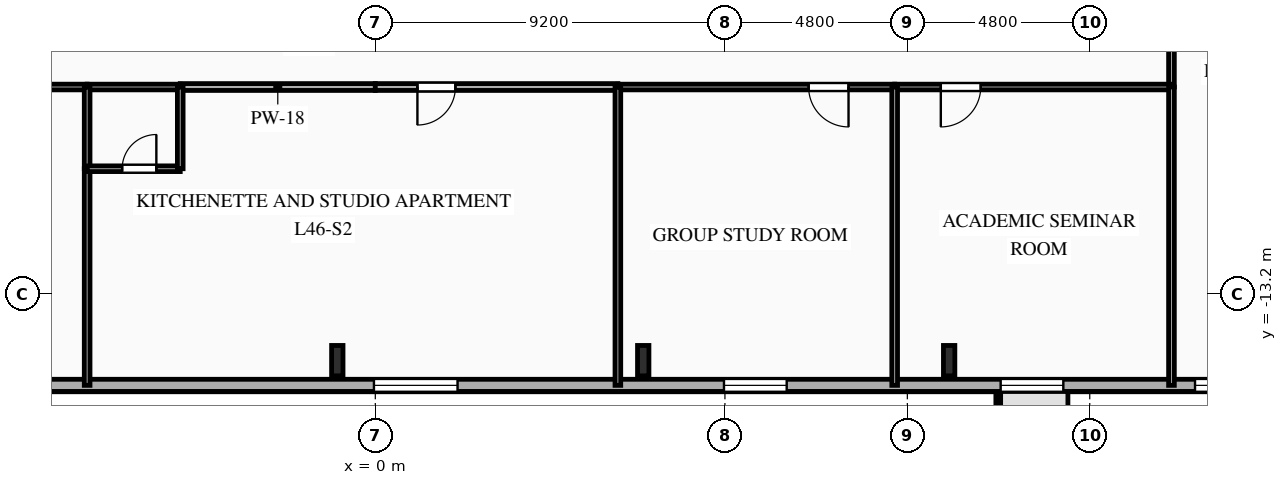
"""IFC4 building model, lengths in metres.
Left out: names, types, materials, properties, quantities, classifications, styles, units other than length and angle.
Written with IfcOpenShell. Run it as: python <this file> out.ifc"""

import sys

from ifc_helpers import new_model, si_unit, direction, frame, frame_2d, origin, origin_2d, place, context, subcontext, project, spatial, rectangle, i_section, extrude, element, fill, save


model = new_model("IFC4")
c1 = context("Model", 3, precision=1e-05, world=origin(), true_north=direction((0.0, 1.0)))
c2 = subcontext(c1, "Body", "Model", "MODEL_VIEW")
j1 = project(units=[si_unit("LENGTHUNIT", "METRE"), si_unit("PLANEANGLEUNIT", "RADIAN")], contexts=[c1])
p1 = place(None, origin())
s1 = spatial("IfcSite", under=j1, at=p1, CompositionType="ELEMENT")
p2 = place(p1, origin())
s2 = spatial("IfcBuilding", under=s1, at=p2, CompositionType="ELEMENT")
p3 = place(p2, frame((0.0, 0.0, 164.5)))
s3 = spatial("IfcBuildingStorey", under=s2, at=p3, CompositionType="ELEMENT", Elevation=164.5)
for number, where, z_axis, x_axis in (
    (1, (-1.0, -14.95, 0.0), (0.0, 0.0, 1.0), (1.0, 0.0, 0.0)),
    (2, (7.05, -14.95, 0.0), (0.0, 0.0, 1.0), (1.0, 0.0, 0.0)),
    (3, (15.1, -14.95, 0.0), (0.0, 0.0, 1.0), (1.0, 0.0, 0.0)),
):
    element("IfcColumn", number, at=place(p3, frame(where, z_axis=z_axis, x_axis=x_axis)), inside=s3, PredefinedType="COLUMN", context=c2, shape_type="SweptSolid", body=[
        extrude(i_section(OverallWidth=0.3, OverallDepth=0.8, WebThickness=0.018, FlangeThickness=0.033, FilletRadius=0.03, at=origin_2d()), origin(), (0.0, 0.0, 1.0), 3.35),
    ])
p4 = place(p3, frame((23.8, -15.6, 0.0), z_axis=(0.0, 0.0, 1.0), x_axis=(-1.0, 0.0, 0.0)))
e4 = element("IfcWall", 4, at=p4, inside=s3, PredefinedType="SOLIDWALL", context=c2, shape_type="SweptSolid", body=[
    extrude(rectangle(XDim=49.6, YDim=0.32, at=frame_2d((24.8, 0.0))), origin(), (0.0, 0.0, 1.0), 3.04),
])
p5 = place(p4, frame((1.13, 0.0, 0.85)))
e5 = element("IfcOpeningElement", 5, at=p5, cuts=e4, PredefinedType="OPENING", context=c2, shape_type="SweptSolid", body=[
    extrude(rectangle(XDim=1.1, YDim=1.85, at=frame_2d((0.55, 0.925))), frame((0.0, 0.17, 0.0), z_axis=(0.0, -1.0, 0.0), x_axis=(1.0, 0.0, 0.0)), (0.0, 0.0, 1.0), 0.34),
])
p6 = place(p4, frame((5.695, 0.0, 0.85)))
e6 = element("IfcOpeningElement", 6, at=p6, cuts=e4, PredefinedType="OPENING", context=c2, shape_type="SweptSolid", body=[
    extrude(rectangle(XDim=1.65, YDim=1.85, at=frame_2d((0.825, 0.925))), frame((0.0, 0.17, 0.0), z_axis=(0.0, -1.0, 0.0), x_axis=(1.0, 0.0, 0.0)), (0.0, 0.0, 1.0), 0.34),
])
p7 = place(p4, frame((12.975, 0.0, 0.85)))
e7 = element("IfcOpeningElement", 7, at=p7, cuts=e4, PredefinedType="OPENING", context=c2, shape_type="SweptSolid", body=[
    extrude(rectangle(XDim=1.65, YDim=1.85, at=frame_2d((0.825, 0.925))), frame((0.0, 0.17, 0.0), z_axis=(0.0, -1.0, 0.0), x_axis=(1.0, 0.0, 0.0)), (0.0, 0.0, 1.0), 0.34),
])
p8 = place(p4, frame((21.636, 0.0, 0.85)))
e8 = element("IfcOpeningElement", 8, at=p8, cuts=e4, PredefinedType="OPENING", context=c2, shape_type="SweptSolid", body=[
    extrude(rectangle(XDim=2.2, YDim=1.85, at=frame_2d((1.1, 0.925))), frame((0.0, 0.17, 0.0), z_axis=(0.0, -1.0, 0.0), x_axis=(1.0, 0.0, 0.0)), (0.0, 0.0, 1.0), 0.34),
])
p9 = place(p4, frame((33.935, 0.0, 0.85)))
e9 = element("IfcOpeningElement", 9, at=p9, cuts=e4, PredefinedType="OPENING", context=c2, shape_type="SweptSolid", body=[
    extrude(rectangle(XDim=1.65, YDim=1.85, at=frame_2d((0.825, 0.925))), frame((0.0, 0.17, 0.0), z_axis=(0.0, -1.0, 0.0), x_axis=(1.0, 0.0, 0.0)), (0.0, 0.0, 1.0), 0.34),
])
p10 = place(p4, frame((41.24, 0.0, 0.85)))
e10 = element("IfcOpeningElement", 10, at=p10, cuts=e4, PredefinedType="OPENING", context=c2, shape_type="SweptSolid", body=[
    extrude(rectangle(XDim=1.65, YDim=1.85, at=frame_2d((0.825, 0.925))), frame((0.0, 0.17, 0.0), z_axis=(0.0, -1.0, 0.0), x_axis=(1.0, 0.0, 0.0)), (0.0, 0.0, 1.0), 0.34),
])
p11 = place(p4, frame((46.175, 0.0, 0.85)))
e11 = element("IfcOpeningElement", 11, at=p11, cuts=e4, PredefinedType="OPENING", context=c2, shape_type="SweptSolid", body=[
    extrude(rectangle(XDim=1.65, YDim=1.85, at=frame_2d((0.825, 0.925))), frame((0.0, 0.17, 0.0), z_axis=(0.0, -1.0, 0.0), x_axis=(1.0, 0.0, 0.0)), (0.0, 0.0, 1.0), 0.34),
])
p12 = place(p3, frame((-7.583, -7.75, 0.0), z_axis=(0.0, 0.0, 1.0), x_axis=(-1.0, 0.0, 0.0)))
e12 = element("IfcWall", 12, at=p12, inside=s3, PredefinedType="PARTITIONING", context=c2, shape_type="SweptSolid", body=[
    extrude(rectangle(XDim=6.684, YDim=0.15, at=frame_2d((3.342, 0.0))), origin(), (0.0, 0.0, 1.0), 3.04),
])
p13 = place(p12, frame((4.494, 0.0, 0.0)))
e13 = element("IfcOpeningElement", 13, at=p13, cuts=e12, PredefinedType="OPENING", context=c2, shape_type="SweptSolid", body=[
    extrude(rectangle(XDim=1.05, YDim=2.15, at=frame_2d((0.525, 1.075))), frame((0.0, 0.085, 0.0), z_axis=(0.0, -1.0, 0.0), x_axis=(1.0, 0.0, 0.0)), (0.0, 0.0, 1.0), 0.17),
])
p14 = place(p3, frame((0.0, -7.75, 0.0), z_axis=(0.0, 0.0, 1.0), x_axis=(-1.0, 0.0, 0.0)))
e14 = element("IfcWall", 14, at=p14, inside=s3, PredefinedType="PARTITIONING", context=c2, shape_type="SweptSolid", body=[
    extrude(rectangle(XDim=5.133, YDim=0.18, at=frame_2d((2.566, 0.0))), origin(), (0.0, 0.0, 1.0), 3.04),
])
p15 = place(p3, frame((-5.133, -7.75, 0.0), z_axis=(0.0, 0.0, 1.0), x_axis=(-1.0, 0.0, 0.0)))
e15 = element("IfcWall", 15, at=p15, inside=s3, PredefinedType="PLUMBINGWALL", context=c2, shape_type="SweptSolid", body=[
    extrude(rectangle(XDim=2.45, YDim=0.15, at=frame_2d((1.225, 0.0))), origin(), (0.0, 0.0, 1.0), 3.04),
])
p16 = place(p3, frame((20.95, -5.6, 0.0), z_axis=(0.0, 0.0, 1.0), x_axis=(0.0, -1.0, 0.0)))
e16 = element("IfcWall", 16, at=p16, inside=s3, PredefinedType="PARTITIONING", context=c2, shape_type="SweptSolid", body=[
    extrude(rectangle(XDim=2.15, YDim=0.15, at=frame_2d((1.075, 0.0))), origin(), (0.0, 0.0, 1.0), 3.04),
])
p17 = place(p3, frame((6.383, -7.75, 0.0), z_axis=(0.0, 0.0, 1.0), x_axis=(-1.0, 0.0, 0.0)))
e17 = element("IfcWall", 17, at=p17, inside=s3, PredefinedType="PARTITIONING", context=c2, shape_type="SweptSolid", body=[
    extrude(rectangle(XDim=6.383, YDim=0.18, at=frame_2d((3.191, 0.0))), origin(), (0.0, 0.0, 1.0), 3.04),
])
p18 = place(p17, frame((4.275, 0.0, 0.0)))
e18 = element("IfcOpeningElement", 18, at=p18, cuts=e17, PredefinedType="OPENING", context=c2, shape_type="SweptSolid", body=[
    extrude(rectangle(XDim=1.0, YDim=2.15, at=frame_2d((0.5, 1.075))), frame((0.0, 0.1, 0.0), z_axis=(0.0, -1.0, 0.0), x_axis=(1.0, 0.0, 0.0)), (0.0, 0.0, 1.0), 0.2),
])
p19 = place(p3, frame((13.667, -7.75, 0.0), z_axis=(0.0, 0.0, 1.0), x_axis=(-1.0, 0.0, 0.0)))
e19 = element("IfcWall", 19, at=p19, inside=s3, PredefinedType="PARTITIONING", context=c2, shape_type="SweptSolid", body=[
    extrude(rectangle(XDim=7.283, YDim=0.15, at=frame_2d((3.642, 0.0))), origin(), (0.0, 0.0, 1.0), 3.04),
])
p20 = place(p19, frame((1.214, 0.0, 0.0)))
e20 = element("IfcOpeningElement", 20, at=p20, cuts=e19, PredefinedType="OPENING", context=c2, shape_type="SweptSolid", body=[
    extrude(rectangle(XDim=1.05, YDim=2.15, at=frame_2d((0.525, 1.075))), frame((0.0, 0.085, 0.0), z_axis=(0.0, -1.0, 0.0), x_axis=(1.0, 0.0, 0.0)), (0.0, 0.0, 1.0), 0.17),
])
p21 = place(p3, frame((20.95, -7.75, 0.0), z_axis=(0.0, 0.0, 1.0), x_axis=(-1.0, 0.0, 0.0)))
e21 = element("IfcWall", 21, at=p21, inside=s3, PredefinedType="PARTITIONING", context=c2, shape_type="SweptSolid", body=[
    extrude(rectangle(XDim=7.283, YDim=0.15, at=frame_2d((3.642, 0.0))), origin(), (0.0, 0.0, 1.0), 3.04),
])
p22 = place(p21, frame((5.019, 0.0, 0.0)))
e22 = element("IfcOpeningElement", 22, at=p22, cuts=e21, PredefinedType="OPENING", context=c2, shape_type="SweptSolid", body=[
    extrude(rectangle(XDim=1.05, YDim=2.15, at=frame_2d((0.525, 1.075))), frame((0.0, 0.085, 0.0), z_axis=(0.0, -1.0, 0.0), x_axis=(1.0, 0.0, 0.0)), (0.0, 0.0, 1.0), 0.17),
])
p23 = place(p3, frame((20.95, -15.6, 0.0), z_axis=(0.0, 0.0, 1.0), x_axis=(0.0, 1.0, 0.0)))
e23 = element("IfcWall", 23, at=p23, inside=s3, PredefinedType="PARTITIONING", context=c2, shape_type="SweptSolid", body=[
    extrude(rectangle(XDim=7.85, YDim=0.15, at=frame_2d((3.925, 0.0))), origin(), (0.0, 0.0, 1.0), 3.04),
])
p24 = place(p3, frame((-7.583, -9.9, 0.0), z_axis=(0.0, 0.0, 1.0), x_axis=(0.0, -1.0, 0.0)))
e24 = element("IfcWall", 24, at=p24, inside=s3, PredefinedType="PARTITIONING", context=c2, shape_type="SweptSolid", body=[
    extrude(rectangle(XDim=5.7, YDim=0.15, at=frame_2d((2.85, 0.0))), origin(), (0.0, 0.0, 1.0), 3.04),
])
p25 = place(p3, frame((-7.583, -7.75, 0.0), z_axis=(0.0, 0.0, 1.0), x_axis=(0.0, -1.0, 0.0)))
e25 = element("IfcWall", 25, at=p25, inside=s3, PredefinedType="PLUMBINGWALL", context=c2, shape_type="SweptSolid", body=[
    extrude(rectangle(XDim=2.15, YDim=0.15, at=frame_2d((1.075, 0.0))), origin(), (0.0, 0.0, 1.0), 3.04),
])
p26 = place(p3, frame((-7.583, -9.9, 0.0), z_axis=(0.0, 0.0, 1.0), x_axis=(1.0, 0.0, 0.0)))
e26 = element("IfcWall", 26, at=p26, inside=s3, PredefinedType="PLUMBINGWALL", context=c2, shape_type="SweptSolid", body=[
    extrude(rectangle(XDim=2.45, YDim=0.15, at=frame_2d((1.225, 0.0))), origin(), (0.0, 0.0, 1.0), 3.04),
])
p27 = place(p26, frame((0.921, 0.0, 0.0)))
e27 = element("IfcOpeningElement", 27, at=p27, cuts=e26, PredefinedType="OPENING", context=c2, shape_type="SweptSolid", body=[
    extrude(rectangle(XDim=0.9, YDim=2.1, at=frame_2d((0.45, 1.05))), frame((0.0, 0.085, 0.0), z_axis=(0.0, -1.0, 0.0), x_axis=(1.0, 0.0, 0.0)), (0.0, 0.0, 1.0), 0.17),
])
p28 = place(p3, frame((-5.133, -9.9, 0.0), z_axis=(0.0, 0.0, 1.0), x_axis=(0.0, 1.0, 0.0)))
e28 = element("IfcWall", 28, at=p28, inside=s3, PredefinedType="PLUMBINGWALL", context=c2, shape_type="SweptSolid", body=[
    extrude(rectangle(XDim=2.15, YDim=0.15, at=frame_2d((1.075, 0.0))), origin(), (0.0, 0.0, 1.0), 3.04),
])
for number, where, z_axis, x_axis in (
    (29, (6.383, -7.75, 0.0), (0.0, 0.0, 1.0), (0.0, -1.0, 0.0)),
    (30, (13.667, -7.75, 0.0), (0.0, 0.0, 1.0), (0.0, -1.0, 0.0)),
):
    element("IfcWall", number, at=place(p3, frame(where, z_axis=z_axis, x_axis=x_axis)), inside=s3, PredefinedType="PARTITIONING", context=c2, shape_type="SweptSolid", body=[
        extrude(rectangle(XDim=7.85, YDim=0.15, at=frame_2d((3.925, 0.0))), origin(), (0.0, 0.0, 1.0), 3.04),
    ])
p29 = place(p5, origin())
e31 = element("IfcWindow", 31, at=p29, inside=s3, PartitioningType="SINGLE_PANEL", PredefinedType="WINDOW", context=c2, shape_type="SweptSolid", body=[
    extrude(rectangle(XDim=1.1, YDim=1.85, at=frame_2d((0.55, 0.925))), frame((0.0, 0.03, 0.0), z_axis=(0.0, -1.0, 0.0), x_axis=(1.0, 0.0, 0.0)), (0.0, 0.0, 1.0), 0.06),
])
fill(e5, e31)
p30 = place(p6, origin())
e32 = element("IfcWindow", 32, at=p30, inside=s3, PartitioningType="SINGLE_PANEL", PredefinedType="WINDOW", context=c2, shape_type="SweptSolid", body=[
    extrude(rectangle(XDim=1.65, YDim=1.85, at=frame_2d((0.825, 0.925))), frame((0.0, 0.03, 0.0), z_axis=(0.0, -1.0, 0.0), x_axis=(1.0, 0.0, 0.0)), (0.0, 0.0, 1.0), 0.06),
])
fill(e6, e32)
p31 = place(p7, origin())
e33 = element("IfcWindow", 33, at=p31, inside=s3, PartitioningType="SINGLE_PANEL", PredefinedType="WINDOW", context=c2, shape_type="SweptSolid", body=[
    extrude(rectangle(XDim=1.65, YDim=1.85, at=frame_2d((0.825, 0.925))), frame((0.0, 0.03, 0.0), z_axis=(0.0, -1.0, 0.0), x_axis=(1.0, 0.0, 0.0)), (0.0, 0.0, 1.0), 0.06),
])
fill(e7, e33)
p32 = place(p8, origin())
e34 = element("IfcWindow", 34, at=p32, inside=s3, PartitioningType="SINGLE_PANEL", PredefinedType="WINDOW", context=c2, shape_type="SweptSolid", body=[
    extrude(rectangle(XDim=2.2, YDim=1.85, at=frame_2d((1.1, 0.925))), frame((0.0, 0.03, 0.0), z_axis=(0.0, -1.0, 0.0), x_axis=(1.0, 0.0, 0.0)), (0.0, 0.0, 1.0), 0.06),
])
fill(e8, e34)
p33 = place(p18, origin())
e35 = element("IfcDoor", 35, at=p33, inside=s3, OperationType="SINGLE_SWING_RIGHT", PredefinedType="DOOR", context=c2, shape_type="SweptSolid", body=[
    extrude(rectangle(XDim=1.0, YDim=2.15, at=frame_2d((0.5, 1.075))), frame((0.0, 0.025, 0.0), z_axis=(0.0, -1.0, 0.0), x_axis=(1.0, 0.0, 0.0)), (0.0, 0.0, 1.0), 0.05),
])
fill(e18, e35)
p34 = place(p20, origin())
e36 = element("IfcDoor", 36, at=p34, inside=s3, OperationType="SINGLE_SWING_LEFT", PredefinedType="DOOR", context=c2, shape_type="SweptSolid", body=[
    extrude(rectangle(XDim=1.05, YDim=2.15, at=frame_2d((0.525, 1.075))), frame((0.0, 0.025, 0.0), z_axis=(0.0, -1.0, 0.0), x_axis=(1.0, 0.0, 0.0)), (0.0, 0.0, 1.0), 0.05),
])
fill(e20, e36)
p35 = place(p22, origin())
e37 = element("IfcDoor", 37, at=p35, inside=s3, OperationType="SINGLE_SWING_RIGHT", PredefinedType="DOOR", context=c2, shape_type="SweptSolid", body=[
    extrude(rectangle(XDim=1.05, YDim=2.15, at=frame_2d((0.525, 1.075))), frame((0.0, 0.025, 0.0), z_axis=(0.0, -1.0, 0.0), x_axis=(1.0, 0.0, 0.0)), (0.0, 0.0, 1.0), 0.05),
])
fill(e22, e37)
p36 = place(p27, origin())
e38 = element("IfcDoor", 38, at=p36, inside=s3, OperationType="SINGLE_SWING_RIGHT", PredefinedType="DOOR", context=c2, shape_type="SweptSolid", body=[
    extrude(rectangle(XDim=0.9, YDim=2.1, at=frame_2d((0.45, 1.05))), frame((0.0, 0.025, 0.0), z_axis=(0.0, -1.0, 0.0), x_axis=(1.0, 0.0, 0.0)), (0.0, 0.0, 1.0), 0.05),
])
fill(e27, e38)
save(model, sys.argv[1])
